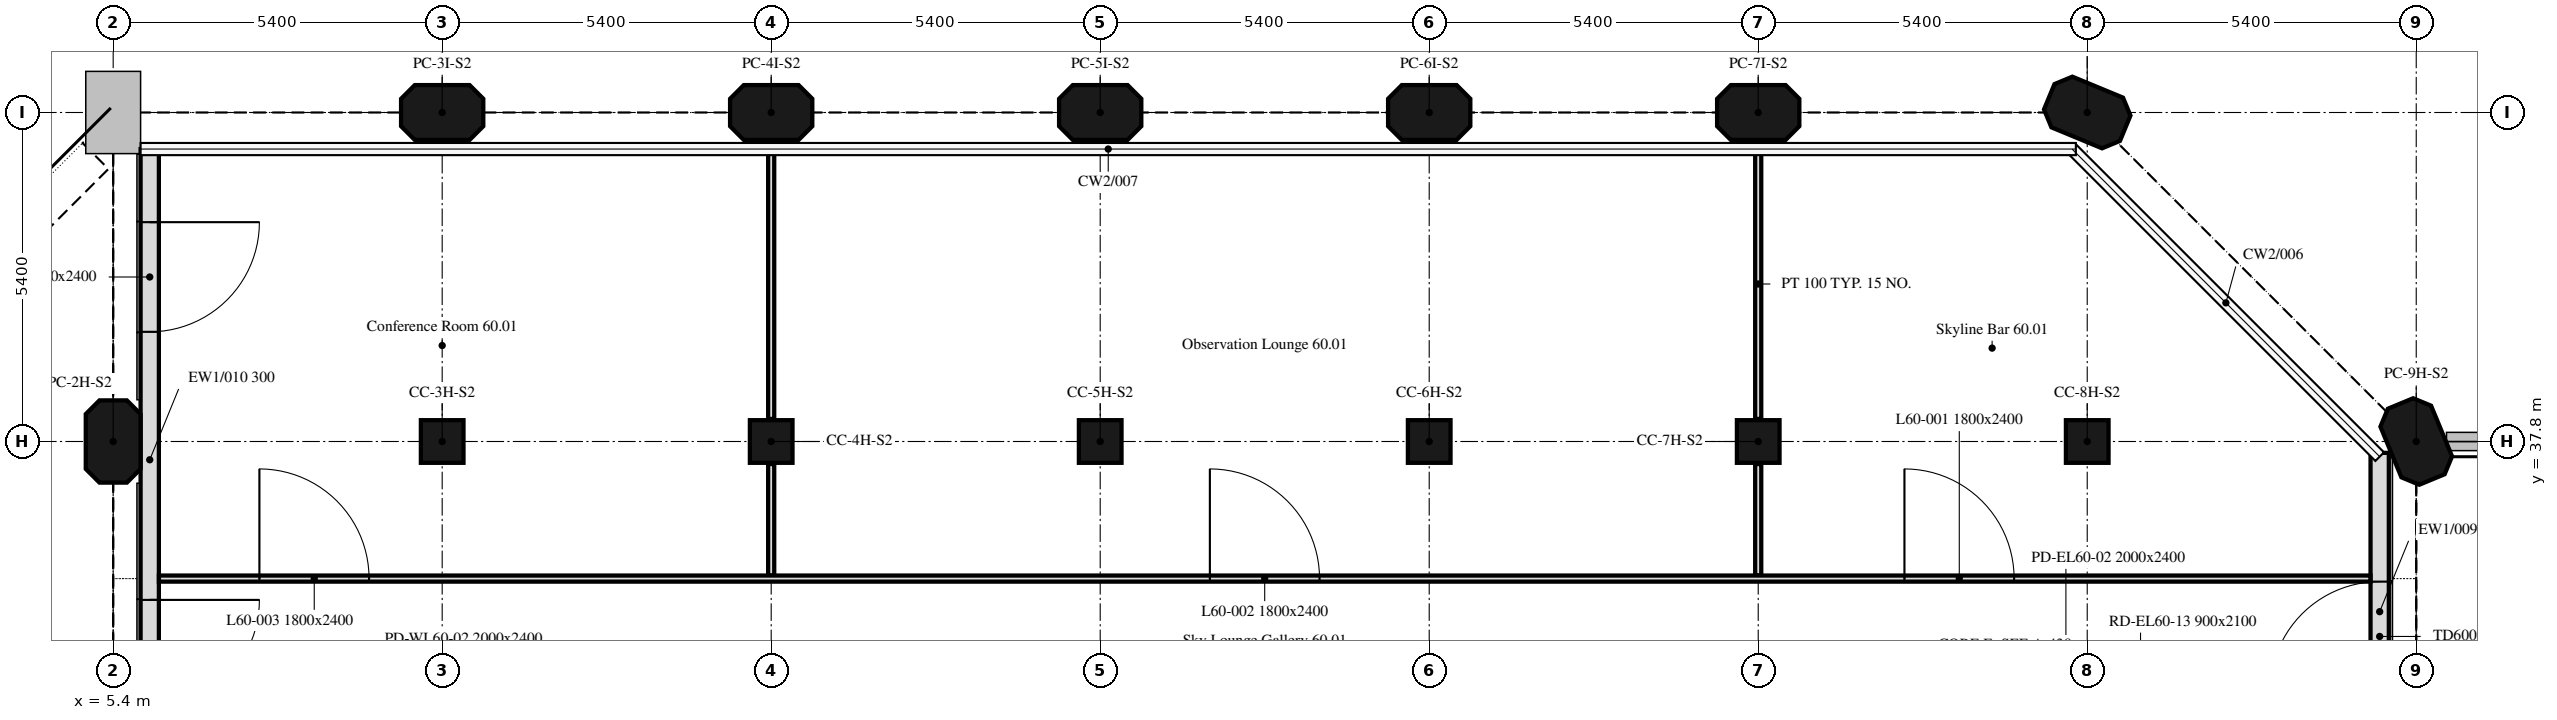
"""IFC4 building model, lengths in metres.
Left out: names, types, materials, properties, quantities, classifications, styles, units other than length and angle.
Written with IfcOpenShell. Run it as: python <this file> out.ifc"""

import sys

from ifc_helpers import new_model, si_unit, direction, frame, frame_2d, origin, origin_2d, place, context, subcontext, project, spatial, polyline, rectangle, outline, extrude, element, fill, save


model = new_model("IFC4")
c1 = context("Model", 3, precision=1e-05, world=origin(), true_north=direction((0.0, 1.0)))
c2 = subcontext(c1, "Body", "Model", "MODEL_VIEW")
j1 = project(units=[si_unit("LENGTHUNIT", "METRE"), si_unit("PLANEANGLEUNIT", "RADIAN")], contexts=[c1])
p1 = place(None, origin())
s1 = spatial("IfcSite", under=j1, at=p1, CompositionType="ELEMENT")
p2 = place(p1, origin())
s2 = spatial("IfcBuilding", under=s1, at=p2, CompositionType="ELEMENT")
p3 = place(p2, frame((0.0, 0.0, 243.1)))
s3 = spatial("IfcBuildingStorey", under=s2, at=p3, CompositionType="ELEMENT", Elevation=243.1)
p4 = place(p3, frame((5.4, 37.8, 0.0), z_axis=(0.0, 0.0, 1.0), x_axis=(0.0, 1.0, 0.0)))
e1 = element("IfcColumn", 1, at=p4, inside=s3, PredefinedType="COLUMN", context=c2, shape_type="SweptSolid", body=[
    extrude(outline(polyline([(-0.45, -0.45), (0.45, -0.45), (0.675, -0.225), (0.675, 0.225), (0.45, 0.45), (-0.45, 0.45), (-0.675, 0.225), (-0.675, -0.225), (-0.45, -0.45)])), origin(), (0.0, 0.0, 1.0), 7.5),
])
for number, where, z_axis, x_axis in (
    (2, (10.8, 37.8, 0.0), (0.0, 0.0, 1.0), (1.0, 0.0, 0.0)),
    (3, (16.2, 37.8, 0.0), (0.0, 0.0, 1.0), (1.0, 0.0, 0.0)),
    (4, (21.6, 37.8, 0.0), (0.0, 0.0, 1.0), (1.0, 0.0, 0.0)),
    (5, (27.0, 37.8, 0.0), (0.0, 0.0, 1.0), (1.0, 0.0, 0.0)),
    (6, (32.4, 37.8, 0.0), (0.0, 0.0, 1.0), (1.0, 0.0, 0.0)),
    (7, (37.8, 37.8, 0.0), (0.0, 0.0, 1.0), (1.0, 0.0, 0.0)),
):
    element("IfcColumn", number, at=place(p3, frame(where, z_axis=z_axis, x_axis=x_axis)), inside=s3, PredefinedType="COLUMN", context=c2, shape_type="SweptSolid", body=[
        extrude(rectangle(XDim=0.7, YDim=0.7, at=origin_2d()), origin(), (0.0, 0.0, 1.0), 7.5),
    ])
for number, where, z_axis, x_axis in (
    (8, (43.2, 37.8, 0.0), (0.0, 0.0, 1.0), (-0.383, 0.924, 0.0)),
    (9, (10.8, 43.2, 0.0), (0.0, 0.0, 1.0), (1.0, 0.0, 0.0)),
    (10, (16.2, 43.2, 0.0), (0.0, 0.0, 1.0), (1.0, 0.0, 0.0)),
    (11, (21.6, 43.2, 0.0), (0.0, 0.0, 1.0), (1.0, 0.0, 0.0)),
    (12, (27.0, 43.2, 0.0), (0.0, 0.0, 1.0), (1.0, 0.0, 0.0)),
    (13, (32.4, 43.2, 0.0), (0.0, 0.0, 1.0), (1.0, 0.0, 0.0)),
    (14, (37.8, 43.2, 0.0), (0.0, 0.0, 1.0), (-0.924, 0.383, 0.0)),
):
    element("IfcColumn", number, at=place(p3, frame(where, z_axis=z_axis, x_axis=x_axis)), inside=s3, PredefinedType="COLUMN", context=c2, shape_type="SweptSolid", body=[
        extrude(outline(polyline([(-0.45, -0.45), (0.45, -0.45), (0.675, -0.225), (0.675, 0.225), (0.45, 0.45), (-0.45, 0.45), (-0.675, 0.225), (-0.675, -0.225), (-0.45, -0.45)])), origin(), (0.0, 0.0, 1.0), 7.5),
    ])
p5 = place(p3, frame((42.6, 32.4, 0.0), z_axis=(0.0, 0.0, 1.0), x_axis=(0.0, 1.0, 0.0)))
e15 = element("IfcWall", 15, at=p5, inside=s3, PredefinedType="SOLIDWALL", context=c2, shape_type="SweptSolid", body=[
    extrude(rectangle(XDim=5.214, YDim=0.3, at=frame_2d((2.607, 0.0))), origin(), (0.0, 0.0, 1.0), 7.5),
])
p6 = place(p5, frame((1.3, 0.0, 0.0)))
e16 = element("IfcOpeningElement", 16, at=p6, cuts=e15, PredefinedType="OPENING", context=c2, shape_type="SweptSolid", body=[
    extrude(rectangle(XDim=1.8, YDim=2.4, at=frame_2d((0.9, 1.2))), frame((0.0, 0.16, 0.0), z_axis=(0.0, -1.0, 0.0), x_axis=(1.0, 0.0, 0.0)), (0.0, 0.0, 1.0), 0.32),
])
p7 = place(p3, frame((6.0, 42.6, 0.0), z_axis=(0.0, 0.0, 1.0), x_axis=(0.0, -1.0, 0.0)))
e17 = element("IfcWall", 17, at=p7, inside=s3, PredefinedType="SOLIDWALL", context=c2, shape_type="SweptSolid", body=[
    extrude(rectangle(XDim=10.2, YDim=0.3, at=frame_2d((5.1, 0.0))), origin(), (0.0, 0.0, 1.0), 7.5),
])
p8 = place(p7, frame((1.2, 0.0, 0.0)))
e18 = element("IfcOpeningElement", 18, at=p8, cuts=e17, PredefinedType="OPENING", context=c2, shape_type="SweptSolid", body=[
    extrude(rectangle(XDim=1.8, YDim=2.4, at=frame_2d((0.9, 1.2))), frame((0.0, 0.16, 0.0), z_axis=(0.0, -1.0, 0.0), x_axis=(1.0, 0.0, 0.0)), (0.0, 0.0, 1.0), 0.32),
])
p9 = place(p7, frame((7.4, 0.0, 0.0)))
e19 = element("IfcOpeningElement", 19, at=p9, cuts=e17, PredefinedType="OPENING", context=c2, shape_type="SweptSolid", body=[
    extrude(rectangle(XDim=1.8, YDim=2.4, at=frame_2d((0.9, 1.2))), frame((0.0, 0.16, 0.0), z_axis=(0.0, -1.0, 0.0), x_axis=(1.0, 0.0, 0.0)), (0.0, 0.0, 1.0), 0.32),
])
p10 = place(p3, frame((32.4, 42.6, 0.0), z_axis=(0.0, 0.0, 1.0), x_axis=(0.0, -1.0, 0.0)))
e20 = element("IfcWall", 20, at=p10, inside=s3, PredefinedType="PARTITIONING", context=c2, shape_type="SweptSolid", body=[
    extrude(rectangle(XDim=4.43, YDim=0.1, at=frame_2d((2.215, 0.0))), origin(), (0.0, 0.0, 1.0), 7.5),
])
p11 = place(p3, frame((32.4, 37.43, 0.0), z_axis=(0.0, 0.0, 1.0), x_axis=(0.0, -1.0, 0.0)))
e21 = element("IfcWall", 21, at=p11, inside=s3, PredefinedType="PARTITIONING", context=c2, shape_type="SweptSolid", body=[
    extrude(rectangle(XDim=1.83, YDim=0.1, at=frame_2d((0.915, 0.0))), origin(), (0.0, 0.0, 1.0), 7.5),
])
p12 = place(p3, frame((16.2, 42.6, 0.0), z_axis=(0.0, 0.0, 1.0), x_axis=(0.0, -1.0, 0.0)))
e22 = element("IfcWall", 22, at=p12, inside=s3, PredefinedType="PARTITIONING", context=c2, shape_type="SweptSolid", body=[
    extrude(rectangle(XDim=4.43, YDim=0.1, at=frame_2d((2.215, 0.0))), origin(), (0.0, 0.0, 1.0), 7.5),
])
p13 = place(p3, frame((16.2, 37.43, 0.0), z_axis=(0.0, 0.0, 1.0), x_axis=(0.0, -1.0, 0.0)))
e23 = element("IfcWall", 23, at=p13, inside=s3, PredefinedType="PARTITIONING", context=c2, shape_type="SweptSolid", body=[
    extrude(rectangle(XDim=1.83, YDim=0.1, at=frame_2d((0.915, 0.0))), origin(), (0.0, 0.0, 1.0), 7.5),
])
p14 = place(p3, frame((6.151, 35.55, 0.0), z_axis=(0.0, 0.0, 1.0), x_axis=(1.0, 0.0, 0.0)))
e24 = element("IfcWall", 24, at=p14, inside=s3, PredefinedType="PARTITIONING", context=c2, shape_type="SweptSolid", body=[
    extrude(rectangle(XDim=36.298, YDim=0.1, at=frame_2d((18.149, 0.0))), origin(), (0.0, 0.0, 1.0), 7.5),
])
p15 = place(p14, frame((28.649, 0.0, 0.0)))
e25 = element("IfcOpeningElement", 25, at=p15, cuts=e24, PredefinedType="OPENING", context=c2, shape_type="SweptSolid", body=[
    extrude(rectangle(XDim=1.8, YDim=2.4, at=frame_2d((0.9, 1.2))), frame((0.0, 0.05, 0.0), z_axis=(0.0, -1.0, 0.0), x_axis=(1.0, 0.0, 0.0)), (0.0, 0.0, 1.0), 0.1),
])
p16 = place(p14, frame((17.249, 0.0, 0.0)))
e26 = element("IfcOpeningElement", 26, at=p16, cuts=e24, PredefinedType="OPENING", context=c2, shape_type="SweptSolid", body=[
    extrude(rectangle(XDim=1.8, YDim=2.4, at=frame_2d((0.9, 1.2))), frame((0.0, 0.05, 0.0), z_axis=(0.0, -1.0, 0.0), x_axis=(1.0, 0.0, 0.0)), (0.0, 0.0, 1.0), 0.1),
])
p17 = place(p14, frame((1.649, 0.0, 0.0)))
e27 = element("IfcOpeningElement", 27, at=p17, cuts=e24, PredefinedType="OPENING", context=c2, shape_type="SweptSolid", body=[
    extrude(rectangle(XDim=1.8, YDim=2.4, at=frame_2d((0.9, 1.2))), frame((0.0, 0.05, 0.0), z_axis=(0.0, -1.0, 0.0), x_axis=(1.0, 0.0, 0.0)), (0.0, 0.0, 1.0), 0.1),
])
p18 = place(p6, origin())
e28 = element("IfcDoor", 28, at=p18, inside=s3, OperationType="DOUBLE_DOOR_DOUBLE_SWING", PredefinedType="DOOR", context=c2, shape_type="SweptSolid", body=[
    extrude(rectangle(XDim=1.8, YDim=2.4, at=frame_2d((0.9, 1.2))), frame((0.0, 0.025, 0.0), z_axis=(0.0, -1.0, 0.0), x_axis=(1.0, 0.0, 0.0)), (0.0, 0.0, 1.0), 0.05),
])
fill(e16, e28)
p19 = place(p8, origin())
e29 = element("IfcDoor", 29, at=p19, inside=s3, OperationType="DOUBLE_DOOR_DOUBLE_SWING", PredefinedType="DOOR", context=c2, shape_type="SweptSolid", body=[
    extrude(rectangle(XDim=1.8, YDim=2.4, at=frame_2d((0.9, 1.2))), frame((0.0, 0.025, 0.0), z_axis=(0.0, -1.0, 0.0), x_axis=(1.0, 0.0, 0.0)), (0.0, 0.0, 1.0), 0.05),
])
fill(e18, e29)
p20 = place(p9, origin())
e30 = element("IfcDoor", 30, at=p20, inside=s3, OperationType="DOUBLE_DOOR_DOUBLE_SWING", PredefinedType="DOOR", context=c2, shape_type="SweptSolid", body=[
    extrude(rectangle(XDim=1.8, YDim=2.4, at=frame_2d((0.9, 1.2))), frame((0.0, 0.025, 0.0), z_axis=(0.0, -1.0, 0.0), x_axis=(1.0, 0.0, 0.0)), (0.0, 0.0, 1.0), 0.05),
])
fill(e19, e30)
p21 = place(p15, origin())
e31 = element("IfcDoor", 31, at=p21, inside=s3, OperationType="DOUBLE_DOOR_SINGLE_SWING", PredefinedType="DOOR", context=c2, shape_type="SweptSolid", body=[
    extrude(rectangle(XDim=1.8, YDim=2.4, at=frame_2d((0.9, 1.2))), frame((0.0, 0.025, 0.0), z_axis=(0.0, -1.0, 0.0), x_axis=(1.0, 0.0, 0.0)), (0.0, 0.0, 1.0), 0.05),
])
fill(e25, e31)
p22 = place(p16, origin())
e32 = element("IfcDoor", 32, at=p22, inside=s3, OperationType="DOUBLE_DOOR_SINGLE_SWING", PredefinedType="DOOR", context=c2, shape_type="SweptSolid", body=[
    extrude(rectangle(XDim=1.8, YDim=2.4, at=frame_2d((0.9, 1.2))), frame((0.0, 0.025, 0.0), z_axis=(0.0, -1.0, 0.0), x_axis=(1.0, 0.0, 0.0)), (0.0, 0.0, 1.0), 0.05),
])
fill(e26, e32)
p23 = place(p17, origin())
e33 = element("IfcDoor", 33, at=p23, inside=s3, OperationType="DOUBLE_DOOR_SINGLE_SWING", PredefinedType="DOOR", context=c2, shape_type="SweptSolid", body=[
    extrude(rectangle(XDim=1.8, YDim=2.4, at=frame_2d((0.9, 1.2))), frame((0.0, 0.025, 0.0), z_axis=(0.0, -1.0, 0.0), x_axis=(1.0, 0.0, 0.0)), (0.0, 0.0, 1.0), 0.05),
])
fill(e27, e33)
save(model, sys.argv[1])
